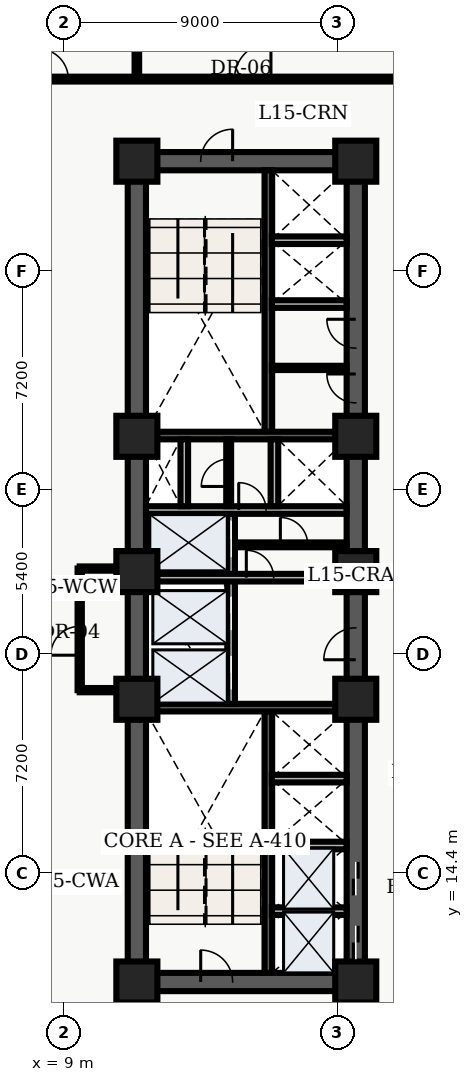
"""IFC4 building model, lengths in metres.
Left out: names, types, materials, properties, quantities, classifications, styles, units other than length and angle.
Written with IfcOpenShell. Run it as: python <this file> out.ifc"""

import sys

from ifc_helpers import new_model, entity, si_unit, converted_unit, direction, frame, origin_with_axes, origin_2d_with_axis, place, context, subcontext, project, spatial, polyline, rectangle, outline, extrude, element, fill, save


model = new_model("IFC4")
c1 = context("Model", 3, precision=1e-05, world=origin_with_axes(), true_north=direction((0.0, 1.0)))
c2 = subcontext(c1, "Body", "Model", "MODEL_VIEW")
j1 = project(units=[si_unit("LENGTHUNIT", "METRE"), converted_unit("PLANEANGLEUNIT", "DEGREE", entity("IfcPlaneAngleMeasure", 0.017), si_unit("PLANEANGLEUNIT", "RADIAN"), dimensions=[0, 0, 0, 0, 0, 0, 0])], contexts=[c1])
p1 = place(None, origin_with_axes())
s1 = spatial("IfcSite", under=j1, at=p1, CompositionType="ELEMENT")
p2 = place(p1, origin_with_axes())
s2 = spatial("IfcBuilding", under=s1, at=p2, CompositionType="ELEMENT")
p3 = place(p2, frame((0.0, 0.0, 63.9), z_axis=(0.0, 0.0, 1.0), x_axis=(1.0, 0.0, 0.0)))
s3 = spatial("IfcBuildingStorey", under=s2, at=p3, CompositionType="ELEMENT", Elevation=63.9)
p4 = place(p3, frame((11.4, 10.8, 0.0), z_axis=(0.0, 0.0, 1.0), x_axis=(0.0, 1.0, 0.0)))
e1 = element("IfcWall", 1, at=p4, inside=s3, PredefinedType="SHEAR", context=c2, shape_type="SweptSolid", body=[
    extrude(outline(polyline([(0.0, -0.3), (27.0, -0.3), (27.0, 0.3), (0.0, 0.3), (0.0, -0.3)])), origin_with_axes(), (0.0, 0.0, 1.0), 3.66),
])
p5 = place(p3, frame((11.4, 10.8, 0.0), z_axis=(0.0, 0.0, 1.0), x_axis=(1.0, 0.0, 0.0)))
e2 = element("IfcWall", 2, at=p5, inside=s3, PredefinedType="SHEAR", context=c2, shape_type="SweptSolid", body=[
    extrude(outline(polyline([(0.0, -0.3), (7.2, -0.3), (7.2, 0.3), (0.0, 0.3), (0.0, -0.3)])), origin_with_axes(), (0.0, 0.0, 1.0), 3.66),
])
p6 = place(p5, frame((2.625, 0.0, 0.0), z_axis=(0.0, 0.0, 1.0), x_axis=(1.0, 0.0, 0.0)))
e3 = element("IfcOpeningElement", 3, at=p6, cuts=e2, PredefinedType="OPENING", context=c2, shape_type="SweptSolid", body=[
    extrude(rectangle(XDim=1.05, YDim=0.62, at=origin_2d_with_axis()), origin_with_axes(), (0.0, 0.0, 1.0), 2.15),
])
p7 = place(p3, frame((11.4, 37.8, 0.0), z_axis=(0.0, 0.0, 1.0), x_axis=(1.0, 0.0, 0.0)))
e4 = element("IfcWall", 4, at=p7, inside=s3, PredefinedType="SHEAR", context=c2, shape_type="SweptSolid", body=[
    extrude(outline(polyline([(0.0, -0.3), (7.2, -0.3), (7.2, 0.3), (0.0, 0.3), (0.0, -0.3)])), origin_with_axes(), (0.0, 0.0, 1.0), 3.66),
])
p8 = place(p7, frame((2.625, 0.0, 0.0), z_axis=(0.0, 0.0, 1.0), x_axis=(1.0, 0.0, 0.0)))
e5 = element("IfcOpeningElement", 5, at=p8, cuts=e4, PredefinedType="OPENING", context=c2, shape_type="SweptSolid", body=[
    extrude(rectangle(XDim=1.05, YDim=0.62, at=origin_2d_with_axis()), origin_with_axes(), (0.0, 0.0, 1.0), 2.15),
])
p9 = place(p3, frame((18.6, 10.8, 0.0), z_axis=(0.0, 0.0, 1.0), x_axis=(0.0, 1.0, 0.0)))
e6 = element("IfcWall", 6, at=p9, inside=s3, PredefinedType="SHEAR", context=c2, shape_type="SweptSolid", body=[
    extrude(outline(polyline([(0.0, -0.3), (13.5, -0.3), (13.5, 0.3), (0.0, 0.3), (0.0, -0.3)])), origin_with_axes(), (0.0, 0.0, 1.0), 3.66),
])
p10 = place(p9, frame((1.3, 0.0, 0.0), z_axis=(0.0, 0.0, 1.0), x_axis=(1.0, 0.0, 0.0)))
e7 = element("IfcOpeningElement", 7, at=p10, cuts=e6, PredefinedType="OPENING", context=c2, shape_type="SweptSolid", body=[
    extrude(rectangle(XDim=1.1, YDim=0.62, at=origin_2d_with_axis()), origin_with_axes(), (0.0, 0.0, 1.0), 2.15),
])
p11 = place(p9, frame((3.4, 0.0, 0.0), z_axis=(0.0, 0.0, 1.0), x_axis=(1.0, 0.0, 0.0)))
e8 = element("IfcOpeningElement", 8, at=p11, cuts=e6, PredefinedType="OPENING", context=c2, shape_type="SweptSolid", body=[
    extrude(rectangle(XDim=1.1, YDim=0.62, at=origin_2d_with_axis()), origin_with_axes(), (0.0, 0.0, 1.0), 2.15),
])
p12 = place(p9, frame((11.125, 0.0, 0.0), z_axis=(0.0, 0.0, 1.0), x_axis=(1.0, 0.0, 0.0)))
e9 = element("IfcOpeningElement", 9, at=p12, cuts=e6, PredefinedType="OPENING", context=c2, shape_type="SweptSolid", body=[
    extrude(rectangle(XDim=1.05, YDim=0.62, at=origin_2d_with_axis()), origin_with_axes(), (0.0, 0.0, 1.0), 2.15),
])
p13 = place(p3, frame((18.6, 24.3, 0.0), z_axis=(0.0, 0.0, 1.0), x_axis=(0.0, 1.0, 0.0)))
e10 = element("IfcWall", 10, at=p13, inside=s3, PredefinedType="SHEAR", context=c2, shape_type="SweptSolid", body=[
    extrude(outline(polyline([(0.0, -0.3), (13.5, -0.3), (13.5, 0.3), (0.0, 0.3), (0.0, -0.3)])), origin_with_axes(), (0.0, 0.0, 1.0), 3.66),
])
p14 = place(p13, frame((6.025, 0.0, 0.0), z_axis=(0.0, 0.0, 1.0), x_axis=(1.0, 0.0, 0.0)))
e11 = element("IfcOpeningElement", 11, at=p14, cuts=e10, PredefinedType="OPENING", context=c2, shape_type="SweptSolid", body=[
    extrude(rectangle(XDim=0.95, YDim=0.62, at=origin_2d_with_axis()), origin_with_axes(), (0.0, 0.0, 1.0), 2.15),
])
p15 = place(p13, frame((7.825, 0.0, 0.0), z_axis=(0.0, 0.0, 1.0), x_axis=(1.0, 0.0, 0.0)))
e12 = element("IfcOpeningElement", 12, at=p15, cuts=e10, PredefinedType="OPENING", context=c2, shape_type="SweptSolid", body=[
    extrude(rectangle(XDim=0.95, YDim=0.62, at=origin_2d_with_axis()), origin_with_axes(), (0.0, 0.0, 1.0), 2.15),
])
p16 = place(p3, frame((15.725, 11.1, 0.0), z_axis=(0.0, 0.0, 1.0), x_axis=(0.0, 1.0, 0.0)))
e13 = element("IfcWall", 13, at=p16, inside=s3, PredefinedType="SHEAR", context=c2, shape_type="SweptSolid", body=[
    extrude(outline(polyline([(0.0, -0.125), (8.6, -0.125), (8.6, 0.125), (0.0, 0.125), (0.0, -0.125)])), origin_with_axes(), (0.0, 0.0, 1.0), 3.66),
])
p17 = place(p3, frame((11.7, 19.825, 0.0), z_axis=(0.0, 0.0, 1.0), x_axis=(1.0, 0.0, 0.0)))
e14 = element("IfcWall", 14, at=p17, inside=s3, PredefinedType="SHEAR", context=c2, shape_type="SweptSolid", body=[
    extrude(outline(polyline([(0.0, -0.125), (6.6, -0.125), (6.6, 0.125), (0.0, 0.125), (0.0, -0.125)])), origin_with_axes(), (0.0, 0.0, 1.0), 3.66),
])
p18 = place(p3, frame((15.725, 28.9, 0.0), z_axis=(0.0, 0.0, 1.0), x_axis=(0.0, 1.0, 0.0)))
e15 = element("IfcWall", 15, at=p18, inside=s3, PredefinedType="SHEAR", context=c2, shape_type="SweptSolid", body=[
    extrude(outline(polyline([(0.0, -0.125), (8.6, -0.125), (8.6, 0.125), (0.0, 0.125), (0.0, -0.125)])), origin_with_axes(), (0.0, 0.0, 1.0), 3.66),
])
p19 = place(p3, frame((11.7, 28.775, 0.0), z_axis=(0.0, 0.0, 1.0), x_axis=(1.0, 0.0, 0.0)))
e16 = element("IfcWall", 16, at=p19, inside=s3, PredefinedType="SHEAR", context=c2, shape_type="SweptSolid", body=[
    extrude(outline(polyline([(0.0, -0.125), (6.6, -0.125), (6.6, 0.125), (0.0, 0.125), (0.0, -0.125)])), origin_with_axes(), (0.0, 0.0, 1.0), 3.66),
])
p20 = place(p3, frame((14.5, 19.95, 0.0), z_axis=(0.0, 0.0, 1.0), x_axis=(0.0, 1.0, 0.0)))
e17 = element("IfcWall", 17, at=p20, inside=s3, PredefinedType="SOLIDWALL", context=c2, shape_type="SweptSolid", body=[
    extrude(outline(polyline([(0.0, -0.125), (6.25, -0.125), (6.25, 0.125), (0.0, 0.125), (0.0, -0.125)])), origin_with_axes(), (0.0, 0.0, 1.0), 2.7),
])
p21 = place(p20, frame((1.025, 0.0, 0.0), z_axis=(0.0, 0.0, 1.0), x_axis=(1.0, 0.0, 0.0)))
e18 = element("IfcOpeningElement", 18, at=p21, cuts=e17, PredefinedType="OPENING", context=c2, shape_type="SweptSolid", body=[
    extrude(rectangle(XDim=1.1, YDim=0.27, at=origin_2d_with_axis()), origin_with_axes(), (0.0, 0.0, 1.0), 2.15),
])
p22 = place(p20, frame((2.975, 0.0, 0.0), z_axis=(0.0, 0.0, 1.0), x_axis=(1.0, 0.0, 0.0)))
e19 = element("IfcOpeningElement", 19, at=p22, cuts=e17, PredefinedType="OPENING", context=c2, shape_type="SweptSolid", body=[
    extrude(rectangle(XDim=1.1, YDim=0.27, at=origin_2d_with_axis()), origin_with_axes(), (0.0, 0.0, 1.0), 2.15),
])
p23 = place(p20, frame((5.425, 0.0, 0.0), z_axis=(0.0, 0.0, 1.0), x_axis=(1.0, 0.0, 0.0)))
e20 = element("IfcOpeningElement", 20, at=p23, cuts=e17, PredefinedType="OPENING", context=c2, shape_type="SweptSolid", body=[
    extrude(rectangle(XDim=1.2, YDim=0.27, at=origin_2d_with_axis()), origin_with_axes(), (0.0, 0.0, 1.0), 2.15),
])
p24 = place(p3, frame((11.7, 24.1, 0.0), z_axis=(0.0, 0.0, 1.0), x_axis=(1.0, 0.0, 0.0)))
e21 = element("IfcWall", 21, at=p24, inside=s3, PredefinedType="SOLIDWALL", context=c2, shape_type="SweptSolid", body=[
    extrude(outline(polyline([(0.0, -0.125), (6.6, -0.125), (6.6, 0.125), (0.0, 0.125), (0.0, -0.125)])), origin_with_axes(), (0.0, 0.0, 1.0), 2.7),
])
p25 = place(p24, frame((3.75, 0.0, 0.0), z_axis=(0.0, 0.0, 1.0), x_axis=(1.0, 0.0, 0.0)))
e22 = element("IfcOpeningElement", 22, at=p25, cuts=e21, PredefinedType="OPENING", context=c2, shape_type="SweptSolid", body=[
    extrude(rectangle(XDim=0.9, YDim=0.27, at=origin_2d_with_axis()), origin_with_axes(), (0.0, 0.0, 1.0), 2.15),
])
p26 = place(p3, frame((11.7, 26.325, 0.0), z_axis=(0.0, 0.0, 1.0), x_axis=(1.0, 0.0, 0.0)))
e23 = element("IfcWall", 23, at=p26, inside=s3, PredefinedType="SOLIDWALL", context=c2, shape_type="SweptSolid", body=[
    extrude(outline(polyline([(0.0, -0.125), (6.6, -0.125), (6.6, 0.125), (0.0, 0.125), (0.0, -0.125)])), origin_with_axes(), (0.0, 0.0, 1.0), 2.7),
])
p27 = place(p26, frame((3.5, 0.0, 0.0), z_axis=(0.0, 0.0, 1.0), x_axis=(1.0, 0.0, 0.0)))
e24 = element("IfcOpeningElement", 24, at=p27, cuts=e23, PredefinedType="OPENING", context=c2, shape_type="SweptSolid", body=[
    extrude(rectangle(XDim=0.9, YDim=0.27, at=origin_2d_with_axis()), origin_with_axes(), (0.0, 0.0, 1.0), 2.15),
])
for number, where, z_axis, x_axis in (
    (25, (12.96, 26.45, 0.0), (0.0, 0.0, 1.0), (0.0, 1.0, 0.0)),
    (26, (15.925, 26.45, 0.0), (0.0, 0.0, 1.0), (0.0, 1.0, 0.0)),
):
    element("IfcWall", number, at=place(p3, frame(where, z_axis=z_axis, x_axis=x_axis)), inside=s3, PredefinedType="SOLIDWALL", context=c2, shape_type="SweptSolid", body=[
        extrude(outline(polyline([(0.0, -0.125), (2.2, -0.125), (2.2, 0.125), (0.0, 0.125), (0.0, -0.125)])), origin_with_axes(), (0.0, 0.0, 1.0), 2.7),
    ])
for number, where, z_axis, x_axis in (
    (27, (11.4, 10.8, 0.0), (0.0, 0.0, 1.0), (1.0, 0.0, 0.0)),
    (28, (11.4, 20.1, 0.0), (0.0, 0.0, 1.0), (1.0, 0.0, 0.0)),
    (29, (11.4, 24.3, 0.0), (0.0, 0.0, 1.0), (1.0, 0.0, 0.0)),
    (30, (11.4, 28.75, 0.0), (0.0, 0.0, 1.0), (1.0, 0.0, 0.0)),
    (31, (11.4, 37.8, 0.0), (0.0, 0.0, 1.0), (1.0, 0.0, 0.0)),
    (32, (18.6, 10.8, 0.0), (0.0, 0.0, 1.0), (1.0, 0.0, 0.0)),
    (33, (18.6, 20.1, 0.0), (0.0, 0.0, 1.0), (1.0, 0.0, 0.0)),
    (34, (18.6, 24.3, 0.0), (0.0, 0.0, 1.0), (1.0, 0.0, 0.0)),
    (35, (18.6, 28.75, 0.0), (0.0, 0.0, 1.0), (1.0, 0.0, 0.0)),
    (36, (18.6, 37.8, 0.0), (0.0, 0.0, 1.0), (1.0, 0.0, 0.0)),
):
    element("IfcColumn", number, at=place(p3, frame(where, z_axis=z_axis, x_axis=x_axis)), inside=s3, PredefinedType="COLUMN", context=c2, shape_type="SweptSolid", body=[
        extrude(rectangle(XDim=1.35, YDim=1.35, at=origin_2d_with_axis()), origin_with_axes(), (0.0, 0.0, 1.0), 3.9),
    ])
p28 = place(p3, frame((14.62, 25.18, 0.0), z_axis=(0.0, 0.0, 1.0), x_axis=(1.0, 0.0, 0.0)))
e37 = element("IfcWall", 37, at=p28, inside=s3, PredefinedType="PARTITIONING", context=c2, shape_type="SweptSolid", body=[
    extrude(outline(polyline([(0.0, -0.08), (3.68, -0.08), (3.68, 0.08), (0.0, 0.08), (0.0, -0.08)])), origin_with_axes(), (0.0, 0.0, 1.0), 2.7),
])
p29 = place(p28, frame((1.95, 0.0, 0.0), z_axis=(0.0, 0.0, 1.0), x_axis=(1.0, 0.0, 0.0)))
e38 = element("IfcOpeningElement", 38, at=p29, cuts=e37, PredefinedType="OPENING", context=c2, shape_type="SweptSolid", body=[
    extrude(rectangle(XDim=0.9, YDim=0.18, at=origin_2d_with_axis()), origin_with_axes(), (0.0, 0.0, 1.0), 2.15),
])
p30 = place(p3, frame((14.42, 26.45, 0.0), z_axis=(0.0, 0.0, 1.0), x_axis=(0.0, 1.0, 0.0)))
e39 = element("IfcWall", 39, at=p30, inside=s3, PredefinedType="PARTITIONING", context=c2, shape_type="SweptSolid", body=[
    extrude(outline(polyline([(0.0, -0.08), (2.2, -0.08), (2.2, 0.08), (0.0, 0.08), (0.0, -0.08)])), origin_with_axes(), (0.0, 0.0, 1.0), 2.7),
])
p31 = place(p30, frame((1.1, 0.0, 0.0), z_axis=(0.0, 0.0, 1.0), x_axis=(1.0, 0.0, 0.0)))
e40 = element("IfcOpeningElement", 40, at=p31, cuts=e39, PredefinedType="OPENING", context=c2, shape_type="SweptSolid", body=[
    extrude(rectangle(XDim=0.9, YDim=0.18, at=origin_2d_with_axis()), origin_with_axes(), (0.0, 0.0, 1.0), 2.15),
])
for number, where, z_axis, x_axis in (
    (41, (15.84, 13.13, 0.0), (0.0, 0.0, 1.0), (1.0, 0.0, 0.0)),
    (42, (15.84, 15.29, 0.0), (0.0, 0.0, 1.0), (1.0, 0.0, 0.0)),
    (43, (15.84, 17.49, 0.0), (0.0, 0.0, 1.0), (1.0, 0.0, 0.0)),
    (44, (15.84, 33.1, 0.0), (0.0, 0.0, 1.0), (1.0, 0.0, 0.0)),
    (45, (15.84, 35.2, 0.0), (0.0, 0.0, 1.0), (1.0, 0.0, 0.0)),
):
    element("IfcWall", number, at=place(p3, frame(where, z_axis=z_axis, x_axis=x_axis)), inside=s3, PredefinedType="SOLIDWALL", context=c2, shape_type="SweptSolid", body=[
        extrude(outline(polyline([(0.0, -0.125), (2.46, -0.125), (2.46, 0.125), (0.0, 0.125), (0.0, -0.125)])), origin_with_axes(), (0.0, 0.0, 1.0), 2.7),
    ])
p32 = place(p3, frame((15.84, 31.0, 0.0), z_axis=(0.0, 0.0, 1.0), x_axis=(1.0, 0.0, 0.0)))
e46 = element("IfcWall", 46, at=p32, inside=s3, PredefinedType="PARTITIONING", context=c2, shape_type="SweptSolid", body=[
    extrude(outline(polyline([(0.0, -0.07), (2.46, -0.07), (2.46, 0.07), (0.0, 0.07), (0.0, -0.07)])), origin_with_axes(), (0.0, 0.0, 1.0), 2.7),
])
p33 = place(p3, frame((9.52, 20.4, 0.0), z_axis=(0.0, 0.0, 1.0), x_axis=(0.0, 1.0, 0.0)))
e47 = element("IfcWall", 47, at=p33, inside=s3, PredefinedType="PARTITIONING", context=c2, shape_type="SweptSolid", body=[
    extrude(outline(polyline([(0.0, -0.07), (4.0, -0.07), (4.0, 0.07), (0.0, 0.07), (0.0, -0.07)])), origin_with_axes(), (0.0, 0.0, 1.0), 2.7),
])
p34 = place(p33, frame((1.625, 0.0, 0.0), z_axis=(0.0, 0.0, 1.0), x_axis=(1.0, 0.0, 0.0)))
e48 = element("IfcOpeningElement", 48, at=p34, cuts=e47, PredefinedType="OPENING", context=c2, shape_type="SweptSolid", body=[
    extrude(rectangle(XDim=0.95, YDim=0.16, at=origin_2d_with_axis()), origin_with_axes(), (0.0, 0.0, 1.0), 2.15),
])
for number, where, z_axis, x_axis in (
    (49, (9.52, 20.4, 0.0), (0.0, 0.0, 1.0), (1.0, 0.0, 0.0)),
    (50, (9.52, 24.4, 0.0), (0.0, 0.0, 1.0), (1.0, 0.0, 0.0)),
):
    element("IfcWall", number, at=place(p3, frame(where, z_axis=z_axis, x_axis=x_axis)), inside=s3, PredefinedType="PARTITIONING", context=c2, shape_type="SweptSolid", body=[
        extrude(outline(polyline([(0.0, -0.07), (1.58, -0.07), (1.58, 0.07), (0.0, 0.07), (0.0, -0.07)])), origin_with_axes(), (0.0, 0.0, 1.0), 2.7),
    ])
p35 = place(p3, frame((2.6, 40.5, 0.0), z_axis=(0.0, 0.0, 1.0), x_axis=(1.0, 0.0, 0.0)))
e51 = element("IfcWall", 51, at=p35, inside=s3, PredefinedType="PARTITIONING", context=c2, shape_type="SweptSolid", body=[
    extrude(outline(polyline([(0.0, -0.08), (18.65, -0.08), (18.65, 0.08), (0.0, 0.08), (0.0, -0.08)])), origin_with_axes(), (0.0, 0.0, 1.0), 2.7),
])
p36 = place(p35, frame((6.045, 0.0, 0.0), z_axis=(0.0, 0.0, 1.0), x_axis=(1.0, 0.0, 0.0)))
e52 = element("IfcOpeningElement", 52, at=p36, cuts=e51, PredefinedType="OPENING", context=c2, shape_type="SweptSolid", body=[
    extrude(rectangle(XDim=1.0, YDim=0.18, at=origin_2d_with_axis()), origin_with_axes(), (0.0, 0.0, 1.0), 2.15),
])
p37 = place(p35, frame((12.61, 0.0, 0.0), z_axis=(0.0, 0.0, 1.0), x_axis=(1.0, 0.0, 0.0)))
e53 = element("IfcOpeningElement", 53, at=p37, cuts=e51, PredefinedType="OPENING", context=c2, shape_type="SweptSolid", body=[
    extrude(rectangle(XDim=1.2, YDim=0.18, at=origin_2d_with_axis()), origin_with_axes(), (0.0, 0.0, 1.0), 2.2),
])
p38 = place(p3, frame((11.4, 40.6, 0.0), z_axis=(0.0, 0.0, 1.0), x_axis=(0.0, 1.0, 0.0)))
e54 = element("IfcWall", 54, at=p38, inside=s3, PredefinedType="PARTITIONING", context=c2, shape_type="SweptSolid", body=[
    extrude(outline(polyline([(0.0, -0.075), (7.64, -0.075), (7.64, 0.075), (0.0, 0.075), (0.0, -0.075)])), origin_with_axes(), (0.0, 0.0, 1.0), 2.7),
])
p39 = place(p9, frame((1.3, 0.0, 0.0), z_axis=(0.0, 0.0, 1.0), x_axis=(1.0, 0.0, 0.0)))
e55 = element("IfcDoor", 55, at=p39, inside=s3, OperationType="SLIDING_TO_LEFT", PredefinedType="DOOR", context=c2, shape_type="SweptSolid", body=[
    extrude(rectangle(XDim=1.1, YDim=0.09, at=origin_2d_with_axis()), origin_with_axes(), (0.0, 0.0, 1.0), 2.15),
])
fill(e7, e55)
p40 = place(p9, frame((3.4, 0.0, 0.0), z_axis=(0.0, 0.0, 1.0), x_axis=(1.0, 0.0, 0.0)))
e56 = element("IfcDoor", 56, at=p40, inside=s3, OperationType="SLIDING_TO_RIGHT", PredefinedType="DOOR", context=c2, shape_type="SweptSolid", body=[
    extrude(rectangle(XDim=1.1, YDim=0.09, at=origin_2d_with_axis()), origin_with_axes(), (0.0, 0.0, 1.0), 2.15),
])
fill(e8, e56)
p41 = place(p20, frame((1.025, 0.0, 0.0), z_axis=(0.0, 0.0, 1.0), x_axis=(1.0, 0.0, 0.0)))
e57 = element("IfcDoor", 57, at=p41, inside=s3, OperationType="SLIDING_TO_LEFT", PredefinedType="DOOR", context=c2, shape_type="SweptSolid", body=[
    extrude(rectangle(XDim=1.1, YDim=0.09, at=origin_2d_with_axis()), origin_with_axes(), (0.0, 0.0, 1.0), 2.15),
])
fill(e18, e57)
p42 = place(p20, frame((2.975, 0.0, 0.0), z_axis=(0.0, 0.0, 1.0), x_axis=(1.0, 0.0, 0.0)))
e58 = element("IfcDoor", 58, at=p42, inside=s3, OperationType="SLIDING_TO_RIGHT", PredefinedType="DOOR", context=c2, shape_type="SweptSolid", body=[
    extrude(rectangle(XDim=1.1, YDim=0.09, at=origin_2d_with_axis()), origin_with_axes(), (0.0, 0.0, 1.0), 2.15),
])
fill(e19, e58)
p43 = place(p20, frame((5.425, 0.0, 0.0), z_axis=(0.0, 0.0, 1.0), x_axis=(1.0, 0.0, 0.0)))
e59 = element("IfcDoor", 59, at=p43, inside=s3, OperationType="DOUBLE_DOOR_SLIDING", PredefinedType="DOOR", context=c2, shape_type="SweptSolid", body=[
    extrude(rectangle(XDim=1.2, YDim=0.09, at=origin_2d_with_axis()), origin_with_axes(), (0.0, 0.0, 1.0), 2.15),
])
fill(e20, e59)
p44 = place(p5, frame((2.625, 0.0, 0.0), z_axis=(0.0, 0.0, 1.0), x_axis=(1.0, 0.0, 0.0)))
e60 = element("IfcDoor", 60, at=p44, inside=s3, OperationType="SINGLE_SWING_LEFT", PredefinedType="DOOR", context=c2, shape_type="SweptSolid", body=[
    extrude(rectangle(XDim=1.05, YDim=0.09, at=origin_2d_with_axis()), origin_with_axes(), (0.0, 0.0, 1.0), 2.15),
])
fill(e3, e60)
p45 = place(p7, frame((2.625, 0.0, 0.0), z_axis=(0.0, 0.0, 1.0), x_axis=(1.0, 0.0, 0.0)))
e61 = element("IfcDoor", 61, at=p45, inside=s3, OperationType="SINGLE_SWING_RIGHT", PredefinedType="DOOR", context=c2, shape_type="SweptSolid", body=[
    extrude(rectangle(XDim=1.05, YDim=0.09, at=origin_2d_with_axis()), origin_with_axes(), (0.0, 0.0, 1.0), 2.15),
])
fill(e5, e61)
p46 = place(p9, frame((11.125, 0.0, 0.0), z_axis=(0.0, 0.0, 1.0), x_axis=(1.0, 0.0, 0.0)))
e62 = element("IfcDoor", 62, at=p46, inside=s3, OperationType="SINGLE_SWING_LEFT", PredefinedType="DOOR", context=c2, shape_type="SweptSolid", body=[
    extrude(rectangle(XDim=1.05, YDim=0.09, at=origin_2d_with_axis()), origin_with_axes(), (0.0, 0.0, 1.0), 2.15),
])
fill(e9, e62)
p47 = place(p26, frame((3.5, 0.0, 0.0), z_axis=(0.0, 0.0, 1.0), x_axis=(1.0, 0.0, 0.0)))
e63 = element("IfcDoor", 63, at=p47, inside=s3, OperationType="SINGLE_SWING_LEFT", PredefinedType="DOOR", context=c2, shape_type="SweptSolid", body=[
    extrude(rectangle(XDim=0.9, YDim=0.09, at=origin_2d_with_axis()), origin_with_axes(), (0.0, 0.0, 1.0), 2.15),
])
fill(e24, e63)
p48 = place(p30, frame((1.1, 0.0, 0.0), z_axis=(0.0, 0.0, 1.0), x_axis=(1.0, 0.0, 0.0)))
e64 = element("IfcDoor", 64, at=p48, inside=s3, OperationType="SINGLE_SWING_LEFT", PredefinedType="DOOR", context=c2, shape_type="SweptSolid", body=[
    extrude(rectangle(XDim=0.9, YDim=0.09, at=origin_2d_with_axis()), origin_with_axes(), (0.0, 0.0, 1.0), 2.15),
])
fill(e40, e64)
p49 = place(p24, frame((3.75, 0.0, 0.0), z_axis=(0.0, 0.0, 1.0), x_axis=(1.0, 0.0, 0.0)))
e65 = element("IfcDoor", 65, at=p49, inside=s3, OperationType="SINGLE_SWING_LEFT", PredefinedType="DOOR", context=c2, shape_type="SweptSolid", body=[
    extrude(rectangle(XDim=0.9, YDim=0.09, at=origin_2d_with_axis()), origin_with_axes(), (0.0, 0.0, 1.0), 2.15),
])
fill(e22, e65)
p50 = place(p28, frame((1.95, 0.0, 0.0), z_axis=(0.0, 0.0, 1.0), x_axis=(1.0, 0.0, 0.0)))
e66 = element("IfcDoor", 66, at=p50, inside=s3, OperationType="SINGLE_SWING_LEFT", PredefinedType="DOOR", context=c2, shape_type="SweptSolid", body=[
    extrude(rectangle(XDim=0.9, YDim=0.09, at=origin_2d_with_axis()), origin_with_axes(), (0.0, 0.0, 1.0), 2.15),
])
fill(e38, e66)
p51 = place(p13, frame((6.025, 0.0, 0.0), z_axis=(0.0, 0.0, 1.0), x_axis=(1.0, 0.0, 0.0)))
e67 = element("IfcDoor", 67, at=p51, inside=s3, OperationType="SINGLE_SWING_RIGHT", PredefinedType="DOOR", context=c2, shape_type="SweptSolid", body=[
    extrude(rectangle(XDim=0.95, YDim=0.09, at=origin_2d_with_axis()), origin_with_axes(), (0.0, 0.0, 1.0), 2.15),
])
fill(e11, e67)
p52 = place(p13, frame((7.825, 0.0, 0.0), z_axis=(0.0, 0.0, 1.0), x_axis=(1.0, 0.0, 0.0)))
e68 = element("IfcDoor", 68, at=p52, inside=s3, OperationType="SINGLE_SWING_RIGHT", PredefinedType="DOOR", context=c2, shape_type="SweptSolid", body=[
    extrude(rectangle(XDim=0.95, YDim=0.09, at=origin_2d_with_axis()), origin_with_axes(), (0.0, 0.0, 1.0), 2.15),
])
fill(e12, e68)
p53 = place(p33, frame((1.625, 0.0, 0.0), z_axis=(0.0, 0.0, 1.0), x_axis=(1.0, 0.0, 0.0)))
e69 = element("IfcDoor", 69, at=p53, inside=s3, OperationType="SINGLE_SWING_LEFT", PredefinedType="DOOR", context=c2, shape_type="SweptSolid", body=[
    extrude(rectangle(XDim=0.95, YDim=0.084, at=origin_2d_with_axis()), origin_with_axes(), (0.0, 0.0, 1.0), 2.15),
])
fill(e48, e69)
p54 = place(p35, frame((6.045, 0.0, 0.0), z_axis=(0.0, 0.0, 1.0), x_axis=(1.0, 0.0, 0.0)))
e70 = element("IfcDoor", 70, at=p54, inside=s3, OperationType="SINGLE_SWING_LEFT", PredefinedType="DOOR", context=c2, shape_type="SweptSolid", body=[
    extrude(rectangle(XDim=1.0, YDim=0.09, at=origin_2d_with_axis()), origin_with_axes(), (0.0, 0.0, 1.0), 2.15),
])
fill(e52, e70)
p55 = place(p35, frame((12.61, 0.0, 0.0), z_axis=(0.0, 0.0, 1.0), x_axis=(1.0, 0.0, 0.0)))
e71 = element("IfcDoor", 71, at=p55, inside=s3, OperationType="SINGLE_SWING_RIGHT", PredefinedType="DOOR", context=c2, shape_type="SweptSolid", body=[
    extrude(rectangle(XDim=1.2, YDim=0.09, at=origin_2d_with_axis()), origin_with_axes(), (0.0, 0.0, 1.0), 2.2),
])
fill(e53, e71)
save(model, sys.argv[1])
